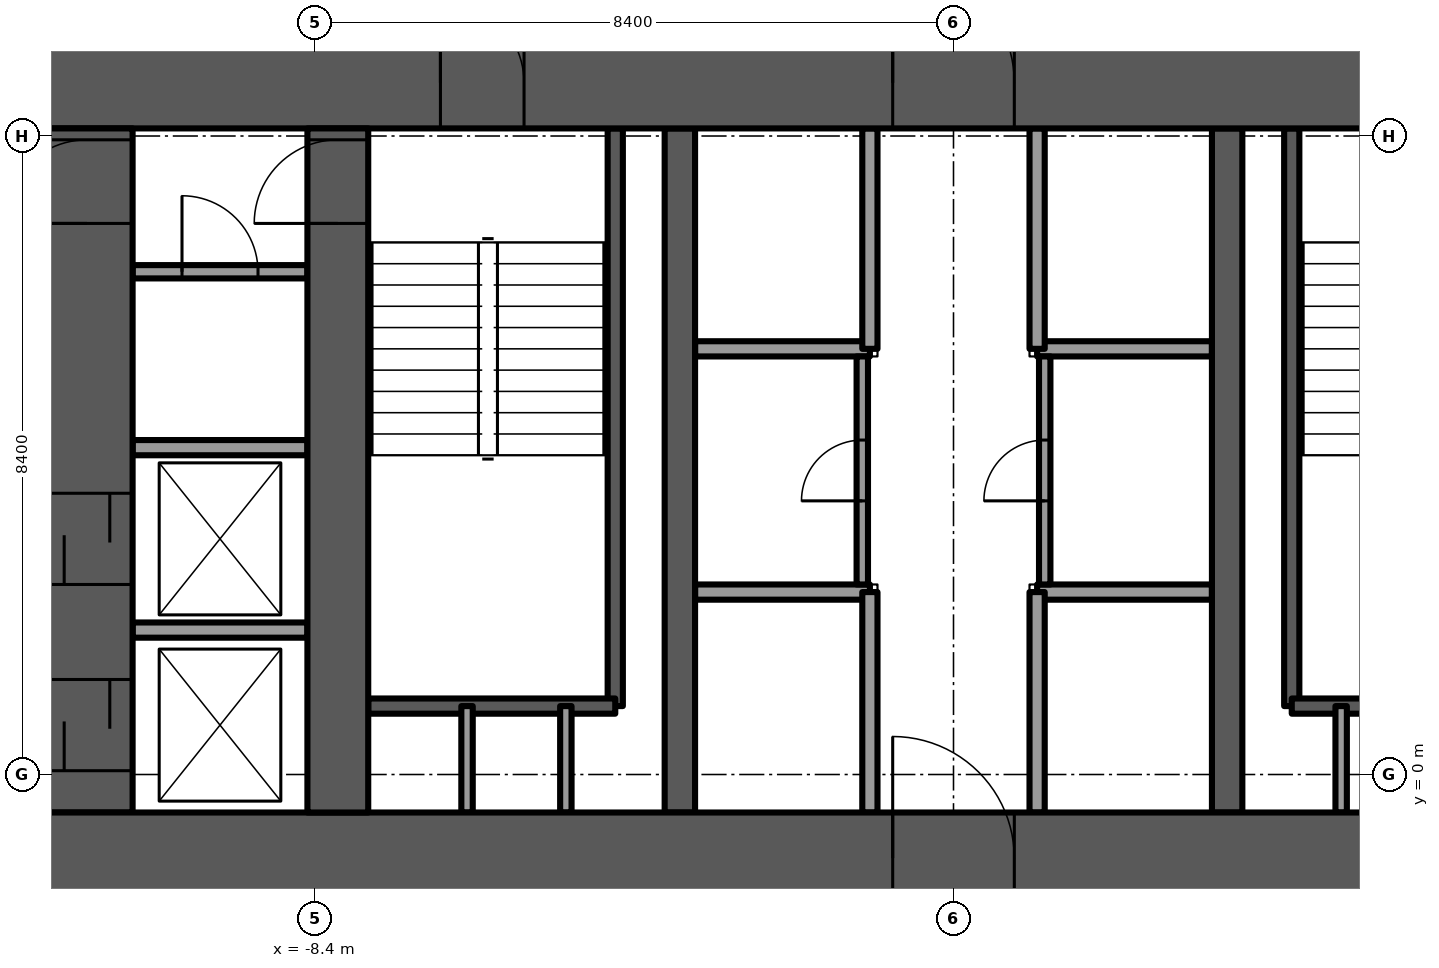
"""IFC4 building model, lengths in metres.
Left out: names, types, materials, properties, quantities, classifications, styles, units other than length and angle.
Written with IfcOpenShell. Run it as: python <this file> out.ifc"""

import sys

from ifc_helpers import new_model, si_unit, direction, frame, frame_2d, origin, place, context, subcontext, project, spatial, rectangle, extrude, element, fill, save


model = new_model("IFC4")
c1 = context("Model", 3, precision=1e-05, world=origin(), true_north=direction((0.0, 1.0)))
c2 = subcontext(c1, "Body", "Model", "MODEL_VIEW")
j1 = project(units=[si_unit("LENGTHUNIT", "METRE"), si_unit("PLANEANGLEUNIT", "RADIAN")], contexts=[c1])
p1 = place(None, origin())
s1 = spatial("IfcSite", under=j1, at=p1, CompositionType="ELEMENT")
p2 = place(p1, origin())
s2 = spatial("IfcBuilding", under=s1, at=p2, CompositionType="ELEMENT")
p3 = place(p2, frame((0.0, 0.0, 39.25)))
s3 = spatial("IfcBuildingStorey", under=s2, at=p3, CompositionType="ELEMENT", Elevation=39.25)
p4 = place(p3, frame((-12.0, -1.1, -0.3), z_axis=(0.0, 0.0, 1.0), x_axis=(1.0, 0.0, 0.0)))
e1 = element("IfcWall", 1, at=p4, inside=s3, PredefinedType="SHEAR", context=c2, shape_type="SweptSolid", body=[
    extrude(rectangle(XDim=24.0, YDim=1.2, at=frame_2d((12.0, 0.0))), origin(), (0.0, 0.0, 1.0), 3.75),
])
p5 = place(p4, frame((11.2, 0.0, 0.0)))
e2 = element("IfcOpeningElement", 2, at=p5, cuts=e1, PredefinedType="OPENING", context=c2, shape_type="SweptSolid", body=[
    extrude(rectangle(XDim=1.6, YDim=2.1, at=frame_2d((0.8, 1.05))), frame((0.0, 0.6, 0.0), z_axis=(0.0, -1.0, 0.0), x_axis=(1.0, 0.0, 0.0)), (0.0, 0.0, 1.0), 1.2),
])
p6 = place(p3, frame((-12.0, 9.1, -0.3), z_axis=(0.0, 0.0, 1.0), x_axis=(1.0, 0.0, 0.0)))
e3 = element("IfcWall", 3, at=p6, inside=s3, PredefinedType="SHEAR", context=c2, shape_type="SweptSolid", body=[
    extrude(rectangle(XDim=24.0, YDim=1.2, at=frame_2d((12.0, 0.0))), origin(), (0.0, 0.0, 1.0), 3.75),
])
p7 = place(p6, frame((11.2, 0.0, 0.0)))
e4 = element("IfcOpeningElement", 4, at=p7, cuts=e3, PredefinedType="OPENING", context=c2, shape_type="SweptSolid", body=[
    extrude(rectangle(XDim=1.6, YDim=2.1, at=frame_2d((0.8, 1.05))), frame((0.0, 0.6, 0.0), z_axis=(0.0, -1.0, 0.0), x_axis=(1.0, 0.0, 0.0)), (0.0, 0.0, 1.0), 1.2),
])
p8 = place(p6, frame((5.25, 0.0, 0.0)))
e5 = element("IfcOpeningElement", 5, at=p8, cuts=e3, PredefinedType="OPENING", context=c2, shape_type="SweptSolid", body=[
    extrude(rectangle(XDim=1.1, YDim=2.1, at=frame_2d((0.55, 1.05))), frame((0.0, 0.6, 0.0), z_axis=(0.0, -1.0, 0.0), x_axis=(1.0, 0.0, 0.0)), (0.0, 0.0, 1.0), 1.2),
])
p9 = place(p6, frame((17.65, 0.0, 0.0)))
e6 = element("IfcOpeningElement", 6, at=p9, cuts=e3, PredefinedType="OPENING", context=c2, shape_type="SweptSolid", body=[
    extrude(rectangle(XDim=1.1, YDim=2.1, at=frame_2d((0.55, 1.05))), frame((0.0, 0.6, 0.0), z_axis=(0.0, -1.0, 0.0), x_axis=(1.0, 0.0, 0.0)), (0.0, 0.0, 1.0), 1.2),
])
p10 = place(p3, frame((-8.1, -0.5, -0.3), z_axis=(0.0, 0.0, 1.0), x_axis=(0.0, 1.0, 0.0)))
e7 = element("IfcWall", 7, at=p10, inside=s3, PredefinedType="SHEAR", context=c2, shape_type="SweptSolid", body=[
    extrude(rectangle(XDim=9.0, YDim=0.8, at=frame_2d((4.5, 0.0))), origin(), (0.0, 0.0, 1.0), 3.75),
])
p11 = place(p10, frame((7.75, 0.0, 0.0)))
e8 = element("IfcOpeningElement", 8, at=p11, cuts=e7, PredefinedType="OPENING", context=c2, shape_type="SweptSolid", body=[
    extrude(rectangle(XDim=1.1, YDim=2.1, at=frame_2d((0.55, 1.05))), frame((0.0, 0.4, 0.0), z_axis=(0.0, -1.0, 0.0), x_axis=(1.0, 0.0, 0.0)), (0.0, 0.0, 1.0), 0.8),
])
for number, where, z_axis, x_axis in (
    (9, (-3.6, -0.5, -0.3), (0.0, 0.0, 1.0), (0.0, 1.0, 0.0)),
    (10, (3.6, -0.5, -0.3), (0.0, 0.0, 1.0), (0.0, 1.0, 0.0)),
):
    element("IfcWall", number, at=place(p3, frame(where, z_axis=z_axis, x_axis=x_axis)), inside=s3, PredefinedType="SHEAR", context=c2, shape_type="SweptSolid", body=[
        extrude(rectangle(XDim=9.0, YDim=0.4, at=frame_2d((4.5, 0.0))), origin(), (0.0, 0.0, 1.0), 3.75),
    ])
p12 = place(p3, frame((-11.4, -0.5, -0.3), z_axis=(0.0, 0.0, 1.0), x_axis=(0.0, 1.0, 0.0)))
e11 = element("IfcWall", 11, at=p12, inside=s3, PredefinedType="SHEAR", context=c2, shape_type="SweptSolid", body=[
    extrude(rectangle(XDim=9.0, YDim=1.2, at=frame_2d((4.5, 0.0))), origin(), (0.0, 0.0, 1.0), 3.75),
])
p13 = place(p12, frame((7.75, 0.0, 0.0)))
e12 = element("IfcOpeningElement", 12, at=p13, cuts=e11, PredefinedType="OPENING", context=c2, shape_type="SweptSolid", body=[
    extrude(rectangle(XDim=1.1, YDim=2.1, at=frame_2d((0.55, 1.05))), frame((0.0, 0.6, 0.0), z_axis=(0.0, -1.0, 0.0), x_axis=(1.0, 0.0, 0.0)), (0.0, 0.0, 1.0), 1.2),
])
p14 = place(p12, frame((0.55, 0.0, 0.0)))
e13 = element("IfcOpeningElement", 13, at=p14, cuts=e11, PredefinedType="OPENING", context=c2, shape_type="SweptSolid", body=[
    extrude(rectangle(XDim=1.2, YDim=2.1, at=frame_2d((0.6, 1.05))), frame((0.0, 0.6, 0.0), z_axis=(0.0, -1.0, 0.0), x_axis=(1.0, 0.0, 0.0)), (0.0, 0.0, 1.0), 1.2),
])
p15 = place(p12, frame((3.0, 0.0, 0.0)))
e14 = element("IfcOpeningElement", 14, at=p15, cuts=e11, PredefinedType="OPENING", context=c2, shape_type="SweptSolid", body=[
    extrude(rectangle(XDim=1.2, YDim=2.1, at=frame_2d((0.6, 1.05))), frame((0.0, 0.6, 0.0), z_axis=(0.0, -1.0, 0.0), x_axis=(1.0, 0.0, 0.0)), (0.0, 0.0, 1.0), 1.2),
])
p16 = place(p3, frame((-9.276, 20.292, 0.0), z_axis=(0.0, 0.0, 1.0), x_axis=(-0.500006057782, -0.866021906294, 0.0)))
e15 = element("IfcWall", 15, at=p16, inside=s3, PredefinedType="SOLIDWALL", context=c2, shape_type="SweptSolid", body=[
    extrude(rectangle(XDim=23.1, YDim=0.15, at=frame_2d((11.55, 0.0))), origin(), (0.0, 0.0, 1.0), 3.45),
])
p17 = place(p16, frame((2.736, 0.0, 0.15)))
e16 = element("IfcOpeningElement", 16, at=p17, cuts=e15, PredefinedType="OPENING", context=c2, shape_type="SweptSolid", body=[
    extrude(rectangle(XDim=0.9, YDim=2.85, at=frame_2d((0.45, 1.425))), frame((0.0, 0.075, 0.0), z_axis=(0.0, -1.0, 0.0), x_axis=(1.0, 0.0, 0.0)), (0.0, 0.0, 1.0), 0.15),
])
p18 = place(p16, frame((3.825, 0.0, 0.15)))
e17 = element("IfcOpeningElement", 17, at=p18, cuts=e15, PredefinedType="OPENING", context=c2, shape_type="SweptSolid", body=[
    extrude(rectangle(XDim=1.5, YDim=2.85, at=frame_2d((0.75, 1.425))), frame((0.0, 0.075, 0.0), z_axis=(0.0, -1.0, 0.0), x_axis=(1.0, 0.0, 0.0)), (0.0, 0.0, 1.0), 0.15),
])
p19 = place(p16, frame((9.32, 0.0, 0.15)))
e18 = element("IfcOpeningElement", 18, at=p19, cuts=e15, PredefinedType="OPENING", context=c2, shape_type="SweptSolid", body=[
    extrude(rectangle(XDim=0.9, YDim=2.85, at=frame_2d((0.45, 1.425))), frame((0.0, 0.075, 0.0), z_axis=(0.0, -1.0, 0.0), x_axis=(1.0, 0.0, 0.0)), (0.0, 0.0, 1.0), 0.15),
])
p20 = place(p16, frame((7.12, 0.0, 0.15)))
e19 = element("IfcOpeningElement", 19, at=p20, cuts=e15, PredefinedType="OPENING", context=c2, shape_type="SweptSolid", body=[
    extrude(rectangle(XDim=1.5, YDim=2.85, at=frame_2d((0.75, 1.425))), frame((0.0, 0.075, 0.0), z_axis=(0.0, -1.0, 0.0), x_axis=(1.0, 0.0, 0.0)), (0.0, 0.0, 1.0), 0.15),
])
p21 = place(p16, frame((11.136, 0.0, 0.15)))
e20 = element("IfcOpeningElement", 20, at=p21, cuts=e15, PredefinedType="OPENING", context=c2, shape_type="SweptSolid", body=[
    extrude(rectangle(XDim=1.8, YDim=2.85, at=frame_2d((0.9, 1.425))), frame((0.0, 0.075, 0.0), z_axis=(0.0, -1.0, 0.0), x_axis=(1.0, 0.0, 0.0)), (0.0, 0.0, 1.0), 0.15),
])
p22 = place(p16, frame((13.236, 0.0, 0.15)))
e21 = element("IfcOpeningElement", 21, at=p22, cuts=e15, PredefinedType="OPENING", context=c2, shape_type="SweptSolid", body=[
    extrude(rectangle(XDim=1.5, YDim=2.85, at=frame_2d((0.75, 1.425))), frame((0.0, 0.075, 0.0), z_axis=(0.0, -1.0, 0.0), x_axis=(1.0, 0.0, 0.0)), (0.0, 0.0, 1.0), 0.15),
])
p23 = place(p16, frame((16.18, 0.0, 0.15)))
e22 = element("IfcOpeningElement", 22, at=p23, cuts=e15, PredefinedType="OPENING", context=c2, shape_type="SweptSolid", body=[
    extrude(rectangle(XDim=1.5, YDim=2.85, at=frame_2d((0.75, 1.425))), frame((0.0, 0.075, 0.0), z_axis=(0.0, -1.0, 0.0), x_axis=(1.0, 0.0, 0.0)), (0.0, 0.0, 1.0), 0.15),
])
p24 = place(p16, frame((0.44, 0.0, 0.15)))
e23 = element("IfcOpeningElement", 23, at=p24, cuts=e15, PredefinedType="OPENING", context=c2, shape_type="SweptSolid", body=[
    extrude(rectangle(XDim=0.9, YDim=2.73, at=frame_2d((0.45, 1.365))), frame((0.0, 0.075, 0.0), z_axis=(0.0, -1.0, 0.0), x_axis=(1.0, 0.0, 0.0)), (0.0, 0.0, 1.0), 0.15),
])
p25 = place(p16, frame((20.978, 0.0, 0.15)))
e24 = element("IfcOpeningElement", 24, at=p25, cuts=e15, PredefinedType="OPENING", context=c2, shape_type="SweptSolid", body=[
    extrude(rectangle(XDim=1.8, YDim=2.73, at=frame_2d((0.9, 1.365))), frame((0.0, 0.075, 0.0), z_axis=(0.0, -1.0, 0.0), x_axis=(1.0, 0.0, 0.0)), (0.0, 0.0, 1.0), 0.15),
])
p26 = place(p3, frame((-20.826, -0.778, 0.0), z_axis=(0.0, 0.0, 1.0), x_axis=(0.499999841607, -0.866025495233, 0.0)))
e25 = element("IfcWall", 25, at=p26, inside=s3, PredefinedType="SOLIDWALL", context=c2, shape_type="SweptSolid", body=[
    extrude(rectangle(XDim=19.479, YDim=0.15, at=frame_2d((9.739, 0.0))), origin(), (0.0, 0.0, 1.0), 3.45),
])
p27 = place(p26, frame((1.639, 0.0, 0.15)))
e26 = element("IfcOpeningElement", 26, at=p27, cuts=e25, PredefinedType="OPENING", context=c2, shape_type="SweptSolid", body=[
    extrude(rectangle(XDim=0.9, YDim=2.85, at=frame_2d((0.45, 1.425))), frame((0.0, 0.075, 0.0), z_axis=(0.0, -1.0, 0.0), x_axis=(1.0, 0.0, 0.0)), (0.0, 0.0, 1.0), 0.15),
])
p28 = place(p26, frame((5.839, 0.0, 0.15)))
e27 = element("IfcOpeningElement", 27, at=p28, cuts=e25, PredefinedType="OPENING", context=c2, shape_type="SweptSolid", body=[
    extrude(rectangle(XDim=1.8, YDim=2.85, at=frame_2d((0.9, 1.425))), frame((0.0, 0.075, 0.0), z_axis=(0.0, -1.0, 0.0), x_axis=(1.0, 0.0, 0.0)), (0.0, 0.0, 1.0), 0.15),
])
p29 = place(p26, frame((7.939, 0.0, 0.0)))
e28 = element("IfcOpeningElement", 28, at=p29, cuts=e25, PredefinedType="OPENING", context=c2, shape_type="SweptSolid", body=[
    extrude(rectangle(XDim=1.5, YDim=2.4, at=frame_2d((0.75, 1.2))), frame((0.0, 0.075, 0.0), z_axis=(0.0, -1.0, 0.0), x_axis=(1.0, 0.0, 0.0)), (0.0, 0.0, 1.0), 0.15),
])
p30 = place(p26, frame((10.039, 0.0, 0.15)))
e29 = element("IfcOpeningElement", 29, at=p30, cuts=e25, PredefinedType="OPENING", context=c2, shape_type="SweptSolid", body=[
    extrude(rectangle(XDim=1.8, YDim=2.85, at=frame_2d((0.9, 1.425))), frame((0.0, 0.075, 0.0), z_axis=(0.0, -1.0, 0.0), x_axis=(1.0, 0.0, 0.0)), (0.0, 0.0, 1.0), 0.15),
])
p31 = place(p26, frame((12.139, 0.0, 0.0)))
e30 = element("IfcOpeningElement", 30, at=p31, cuts=e25, PredefinedType="OPENING", context=c2, shape_type="SweptSolid", body=[
    extrude(rectangle(XDim=1.5, YDim=2.4, at=frame_2d((0.75, 1.2))), frame((0.0, 0.075, 0.0), z_axis=(0.0, -1.0, 0.0), x_axis=(1.0, 0.0, 0.0)), (0.0, 0.0, 1.0), 0.15),
])
p32 = place(p26, frame((14.239, 0.0, 0.15)))
e31 = element("IfcOpeningElement", 31, at=p32, cuts=e25, PredefinedType="OPENING", context=c2, shape_type="SweptSolid", body=[
    extrude(rectangle(XDim=1.8, YDim=2.85, at=frame_2d((0.9, 1.425))), frame((0.0, 0.075, 0.0), z_axis=(0.0, -1.0, 0.0), x_axis=(1.0, 0.0, 0.0)), (0.0, 0.0, 1.0), 0.15),
])
p33 = place(p26, frame((16.339, 0.0, 0.0)))
e32 = element("IfcOpeningElement", 32, at=p33, cuts=e25, PredefinedType="OPENING", context=c2, shape_type="SweptSolid", body=[
    extrude(rectangle(XDim=1.5, YDim=2.4, at=frame_2d((0.75, 1.2))), frame((0.0, 0.075, 0.0), z_axis=(0.0, -1.0, 0.0), x_axis=(1.0, 0.0, 0.0)), (0.0, 0.0, 1.0), 0.15),
])
for number, where, z_axis, x_axis in (
    (33, (-3.4, 2.4, 0.0), (0.0, 0.0, 1.0), (1.0, 0.0, 0.0)),
    (34, (-3.4, 5.6, 0.0), (0.0, 0.0, 1.0), (1.0, 0.0, 0.0)),
    (35, (1.1, 2.4, 0.0), (0.0, 0.0, 1.0), (1.0, 0.0, 0.0)),
    (36, (1.1, 5.6, 0.0), (0.0, 0.0, 1.0), (1.0, 0.0, 0.0)),
):
    element("IfcWall", number, at=place(p3, frame(where, z_axis=z_axis, x_axis=x_axis)), inside=s3, PredefinedType="PARTITIONING", context=c2, shape_type="SweptSolid", body=[
        extrude(rectangle(XDim=2.3, YDim=0.2, at=frame_2d((1.15, 0.0))), origin(), (0.0, 0.0, 1.0), 3.45),
    ])
for number, where, z_axis, x_axis in (
    (37, (-1.1, -0.5, 0.0), (0.0, 0.0, 1.0), (0.0, 1.0, 0.0)),
    (38, (1.1, -0.5, 0.0), (0.0, 0.0, 1.0), (0.0, 1.0, 0.0)),
    (39, (-1.1, 5.6, 0.0), (0.0, 0.0, 1.0), (0.0, 1.0, 0.0)),
    (40, (1.1, 5.6, 0.0), (0.0, 0.0, 1.0), (0.0, 1.0, 0.0)),
):
    element("IfcWall", number, at=place(p3, frame(where, z_axis=z_axis, x_axis=x_axis)), inside=s3, PredefinedType="PARTITIONING", context=c2, shape_type="SweptSolid", body=[
        extrude(rectangle(XDim=2.9, YDim=0.2, at=frame_2d((1.45, 0.0))), origin(), (0.0, 0.0, 1.0), 3.45),
    ])
p34 = place(p3, frame((-4.45, 0.9, -0.3), z_axis=(0.0, 0.0, 1.0), x_axis=(0.0, 1.0, 0.0)))
e41 = element("IfcWall", 41, at=p34, inside=s3, PredefinedType="SOLIDWALL", context=c2, shape_type="SweptSolid", body=[
    extrude(rectangle(XDim=7.6, YDim=0.2, at=frame_2d((3.8, 0.0))), origin(), (0.0, 0.0, 1.0), 3.75),
])
p35 = place(p3, frame((-7.7, 0.9, -0.3), z_axis=(0.0, 0.0, 1.0), x_axis=(1.0, 0.0, 0.0)))
e42 = element("IfcWall", 42, at=p35, inside=s3, PredefinedType="SOLIDWALL", context=c2, shape_type="SweptSolid", body=[
    extrude(rectangle(XDim=3.25, YDim=0.2, at=frame_2d((1.625, 0.0))), origin(), (0.0, 0.0, 1.0), 3.75),
])
for number, where, z_axis, x_axis in (
    (43, (-6.4, -0.5, 0.0), (0.0, 0.0, 1.0), (0.0, 1.0, 0.0)),
    (44, (-5.1, -0.5, 0.0), (0.0, 0.0, 1.0), (0.0, 1.0, 0.0)),
):
    element("IfcWall", number, at=place(p3, frame(where, z_axis=z_axis, x_axis=x_axis)), inside=s3, PredefinedType="PARTITIONING", context=c2, shape_type="SweptSolid", body=[
        extrude(rectangle(XDim=1.4, YDim=0.15, at=frame_2d((0.7, 0.0))), origin(), (0.0, 0.0, 1.0), 3.45),
    ])
p36 = place(p3, frame((4.45, 0.9, -0.3), z_axis=(0.0, 0.0, 1.0), x_axis=(0.0, 1.0, 0.0)))
e45 = element("IfcWall", 45, at=p36, inside=s3, PredefinedType="SOLIDWALL", context=c2, shape_type="SweptSolid", body=[
    extrude(rectangle(XDim=7.6, YDim=0.2, at=frame_2d((3.8, 0.0))), origin(), (0.0, 0.0, 1.0), 3.75),
])
p37 = place(p3, frame((4.45, 0.9, -0.3), z_axis=(0.0, 0.0, 1.0), x_axis=(1.0, 0.0, 0.0)))
e46 = element("IfcWall", 46, at=p37, inside=s3, PredefinedType="SOLIDWALL", context=c2, shape_type="SweptSolid", body=[
    extrude(rectangle(XDim=3.25, YDim=0.2, at=frame_2d((1.625, 0.0))), origin(), (0.0, 0.0, 1.0), 3.75),
])
p38 = place(p3, frame((5.1, -0.5, 0.0), z_axis=(0.0, 0.0, 1.0), x_axis=(0.0, 1.0, 0.0)))
e47 = element("IfcWall", 47, at=p38, inside=s3, PredefinedType="PARTITIONING", context=c2, shape_type="SweptSolid", body=[
    extrude(rectangle(XDim=1.4, YDim=0.15, at=frame_2d((0.7, 0.0))), origin(), (0.0, 0.0, 1.0), 3.45),
])
p39 = place(p3, frame((-1.2, 2.5, 0.0), z_axis=(0.0, 0.0, 1.0), x_axis=(0.0, 1.0, 0.0)))
e48 = element("IfcWall", 48, at=p39, inside=s3, PredefinedType="PARTITIONING", context=c2, shape_type="SweptSolid", body=[
    extrude(rectangle(XDim=3.0, YDim=0.15, at=frame_2d((1.5, 0.0))), origin(), (0.0, 0.0, 1.0), 3.45),
])
p40 = place(p39, frame((1.1, 0.0, 0.0)))
e49 = element("IfcOpeningElement", 49, at=p40, cuts=e48, PredefinedType="OPENING", context=c2, shape_type="SweptSolid", body=[
    extrude(rectangle(XDim=0.8, YDim=2.1, at=frame_2d((0.4, 1.05))), frame((0.0, 0.075, 0.0), z_axis=(0.0, -1.0, 0.0), x_axis=(1.0, 0.0, 0.0)), (0.0, 0.0, 1.0), 0.15),
])
p41 = place(p3, frame((1.2, 2.5, 0.0), z_axis=(0.0, 0.0, 1.0), x_axis=(0.0, 1.0, 0.0)))
e50 = element("IfcWall", 50, at=p41, inside=s3, PredefinedType="PARTITIONING", context=c2, shape_type="SweptSolid", body=[
    extrude(rectangle(XDim=3.0, YDim=0.15, at=frame_2d((1.5, 0.0))), origin(), (0.0, 0.0, 1.0), 3.45),
])
p42 = place(p41, frame((1.1, 0.0, 0.0)))
e51 = element("IfcOpeningElement", 51, at=p42, cuts=e50, PredefinedType="OPENING", context=c2, shape_type="SweptSolid", body=[
    extrude(rectangle(XDim=0.8, YDim=2.1, at=frame_2d((0.4, 1.05))), frame((0.0, 0.075, 0.0), z_axis=(0.0, -1.0, 0.0), x_axis=(1.0, 0.0, 0.0)), (0.0, 0.0, 1.0), 0.15),
])
for number, where, z_axis, x_axis in (
    (52, (-10.8, 1.9, 0.0), (0.0, 0.0, 1.0), (1.0, 0.0, 0.0)),
    (53, (-10.8, 4.3, 0.0), (0.0, 0.0, 1.0), (1.0, 0.0, 0.0)),
):
    element("IfcWall", number, at=place(p3, frame(where, z_axis=z_axis, x_axis=x_axis)), inside=s3, PredefinedType="PARTITIONING", context=c2, shape_type="SweptSolid", body=[
        extrude(rectangle(XDim=2.3, YDim=0.2, at=frame_2d((1.15, 0.0))), origin(), (0.0, 0.0, 1.0), 3.45),
    ])
p43 = place(p3, frame((-10.8, 6.614, 0.0), z_axis=(0.0, 0.0, 1.0), x_axis=(1.0, 0.0, 0.0)))
e54 = element("IfcWall", 54, at=p43, inside=s3, PredefinedType="PARTITIONING", context=c2, shape_type="SweptSolid", body=[
    extrude(rectangle(XDim=2.3, YDim=0.175, at=frame_2d((1.15, 0.0))), origin(), (0.0, 0.0, 1.0), 3.45),
])
p44 = place(p43, frame((0.65, 0.0, 0.0)))
e55 = element("IfcOpeningElement", 55, at=p44, cuts=e54, PredefinedType="OPENING", context=c2, shape_type="SweptSolid", body=[
    extrude(rectangle(XDim=1.0, YDim=2.1, at=frame_2d((0.5, 1.05))), frame((0.0, 0.087, 0.0), z_axis=(0.0, -1.0, 0.0), x_axis=(1.0, 0.0, 0.0)), (0.0, 0.0, 1.0), 0.175),
])
p45 = place(p5, origin())
e56 = element("IfcDoor", 56, at=p45, inside=s3, OperationType="DOUBLE_DOOR_SINGLE_SWING", PredefinedType="DOOR", context=c2, shape_type="SweptSolid", body=[
    extrude(rectangle(XDim=1.6, YDim=2.1, at=frame_2d((0.8, 1.05))), frame((0.0, 0.025, 0.0), z_axis=(0.0, -1.0, 0.0), x_axis=(1.0, 0.0, 0.0)), (0.0, 0.0, 1.0), 0.05),
])
fill(e2, e56)
p46 = place(p7, origin())
e57 = element("IfcDoor", 57, at=p46, inside=s3, OperationType="DOUBLE_DOOR_SINGLE_SWING", PredefinedType="DOOR", context=c2, shape_type="SweptSolid", body=[
    extrude(rectangle(XDim=1.6, YDim=2.1, at=frame_2d((0.8, 1.05))), frame((0.0, 0.025, 0.0), z_axis=(0.0, -1.0, 0.0), x_axis=(1.0, 0.0, 0.0)), (0.0, 0.0, 1.0), 0.05),
])
fill(e4, e57)
p47 = place(p8, origin())
e58 = element("IfcDoor", 58, at=p47, inside=s3, OperationType="SINGLE_SWING_LEFT", PredefinedType="DOOR", context=c2, shape_type="SweptSolid", body=[
    extrude(rectangle(XDim=1.1, YDim=2.1, at=frame_2d((0.55, 1.05))), frame((0.0, 0.025, 0.0), z_axis=(0.0, -1.0, 0.0), x_axis=(1.0, 0.0, 0.0)), (0.0, 0.0, 1.0), 0.05),
])
fill(e5, e58)
p48 = place(p11, origin())
e59 = element("IfcDoor", 59, at=p48, inside=s3, OperationType="SINGLE_SWING_RIGHT", PredefinedType="DOOR", context=c2, shape_type="SweptSolid", body=[
    extrude(rectangle(XDim=1.1, YDim=2.1, at=frame_2d((0.55, 1.05))), frame((0.0, 0.025, 0.0), z_axis=(0.0, -1.0, 0.0), x_axis=(1.0, 0.0, 0.0)), (0.0, 0.0, 1.0), 0.05),
])
fill(e8, e59)
p49 = place(p40, origin())
e60 = element("IfcDoor", 60, at=p49, inside=s3, OperationType="SINGLE_SWING_LEFT", PredefinedType="DOOR", context=c2, shape_type="SweptSolid", body=[
    extrude(rectangle(XDim=0.8, YDim=2.1, at=frame_2d((0.4, 1.05))), frame((0.0, 0.025, 0.0), z_axis=(0.0, -1.0, 0.0), x_axis=(1.0, 0.0, 0.0)), (0.0, 0.0, 1.0), 0.05),
])
fill(e49, e60)
p50 = place(p42, origin())
e61 = element("IfcDoor", 61, at=p50, inside=s3, OperationType="SINGLE_SWING_RIGHT", PredefinedType="DOOR", context=c2, shape_type="SweptSolid", body=[
    extrude(rectangle(XDim=0.8, YDim=2.1, at=frame_2d((0.4, 1.05))), frame((0.0, 0.025, 0.0), z_axis=(0.0, -1.0, 0.0), x_axis=(1.0, 0.0, 0.0)), (0.0, 0.0, 1.0), 0.05),
])
fill(e51, e61)
p51 = place(p44, origin())
e62 = element("IfcDoor", 62, at=p51, inside=s3, OperationType="SINGLE_SWING_LEFT", PredefinedType="DOOR", context=c2, shape_type="SweptSolid", body=[
    extrude(rectangle(XDim=1.0, YDim=2.1, at=frame_2d((0.5, 1.05))), frame((0.0, 0.025, 0.0), z_axis=(0.0, -1.0, 0.0), x_axis=(1.0, 0.0, 0.0)), (0.0, 0.0, 1.0), 0.05),
])
fill(e55, e62)
p52 = place(p13, origin())
e63 = element("IfcDoor", 63, at=p52, inside=s3, OperationType="SINGLE_SWING_LEFT", PredefinedType="DOOR", context=c2, shape_type="SweptSolid", body=[
    extrude(rectangle(XDim=1.1, YDim=2.1, at=frame_2d((0.55, 1.05))), frame((0.0, 0.025, 0.0), z_axis=(0.0, -1.0, 0.0), x_axis=(1.0, 0.0, 0.0)), (0.0, 0.0, 1.0), 0.05),
])
fill(e12, e63)
p53 = place(p14, origin())
e64 = element("IfcDoor", 64, at=p53, inside=s3, OperationType="SLIDING_TO_LEFT", PredefinedType="DOOR", context=c2, shape_type="SweptSolid", body=[
    extrude(rectangle(XDim=1.2, YDim=2.1, at=frame_2d((0.6, 1.05))), frame((0.0, 0.025, 0.0), z_axis=(0.0, -1.0, 0.0), x_axis=(1.0, 0.0, 0.0)), (0.0, 0.0, 1.0), 0.05),
])
fill(e13, e64)
p54 = place(p15, origin())
e65 = element("IfcDoor", 65, at=p54, inside=s3, OperationType="SLIDING_TO_LEFT", PredefinedType="DOOR", context=c2, shape_type="SweptSolid", body=[
    extrude(rectangle(XDim=1.2, YDim=2.1, at=frame_2d((0.6, 1.05))), frame((0.0, 0.025, 0.0), z_axis=(0.0, -1.0, 0.0), x_axis=(1.0, 0.0, 0.0)), (0.0, 0.0, 1.0), 0.05),
])
fill(e14, e65)
save(model, sys.argv[1])
